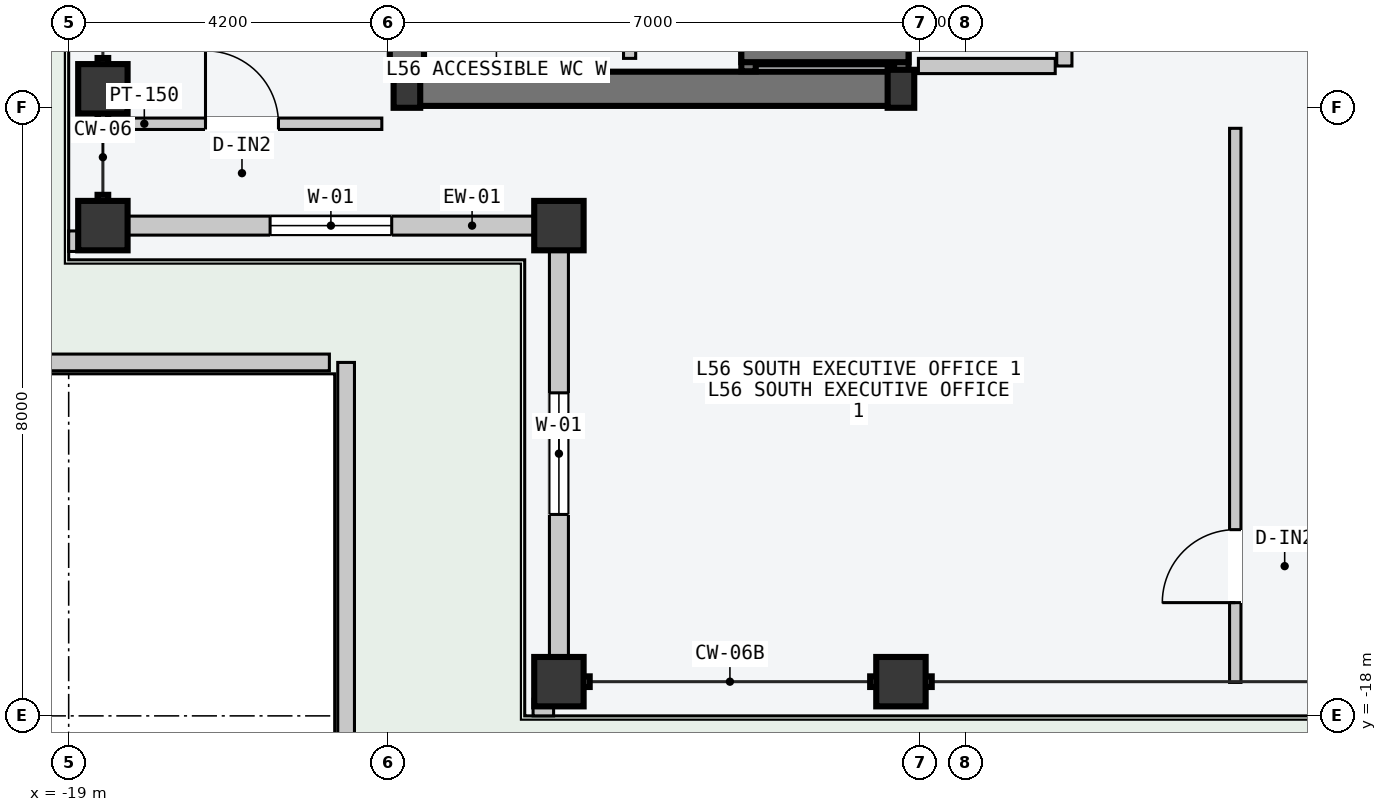
"""IFC4 building model, lengths in metres.
Left out: names, types, materials, properties, quantities, classifications, styles, units other than length and angle.
Written with IfcOpenShell. Run it as: python <this file> out.ifc"""

import sys

from ifc_helpers import new_model, si_unit, direction, frame, frame_2d, origin, origin_2d, place, context, subcontext, project, spatial, rectangle, hollow_rectangle, i_section, extrude, element, fill, save


model = new_model("IFC4")
c1 = context("Model", 3, precision=1e-05, world=origin(), true_north=direction((0.0, 1.0)))
c2 = subcontext(c1, "Body", "Model", "MODEL_VIEW")
j1 = project(units=[si_unit("LENGTHUNIT", "METRE"), si_unit("PLANEANGLEUNIT", "RADIAN")], contexts=[c1])
p1 = place(None, origin())
s1 = spatial("IfcSite", under=j1, at=p1, CompositionType="ELEMENT")
p2 = place(p1, origin())
s2 = spatial("IfcBuilding", under=s1, at=p2, CompositionType="ELEMENT")
p3 = place(p2, frame((0.0, 0.0, 213.9)))
s3 = spatial("IfcBuildingStorey", under=s2, at=p3, CompositionType="ELEMENT", Elevation=213.9)
p4 = place(p3, frame((-14.53, -9.75, -0.2), z_axis=(0.0, 0.0, 1.0), x_axis=(1.0, 0.0, 0.0)))
e1 = element("IfcWall", 1, at=p4, inside=s3, PredefinedType="SHEAR", context=c2, shape_type="SweptSolid", body=[
    extrude(rectangle(XDim=6.46, YDim=0.45, at=frame_2d((3.23, 0.0))), origin(), (0.0, 0.0, 1.0), 4.5),
])
p5 = place(p3, frame((-14.55, -9.5, -0.2), z_axis=(0.0, 0.0, 1.0), x_axis=(0.0, 1.0, 0.0)))
e2 = element("IfcWall", 2, at=p5, inside=s3, PredefinedType="SHEAR", context=c2, shape_type="SweptSolid", body=[
    extrude(rectangle(XDim=9.25, YDim=0.45, at=frame_2d((4.625, 0.0))), origin(), (0.0, 0.0, 1.0), 4.5),
])
for number, where, z_axis, x_axis in (
    (3, (-14.55, -9.75, 0.0), (0.0, 0.0, 1.0), (1.0, 0.0, 0.0)),
    (4, (-8.05, -9.75, 0.0), (0.0, 0.0, 1.0), (1.0, 0.0, 0.0)),
):
    element("IfcColumn", number, at=place(p3, frame(where, z_axis=z_axis, x_axis=x_axis)), inside=s3, PredefinedType="COLUMN", context=c2, shape_type="SweptSolid", body=[
        extrude(i_section(OverallWidth=0.35, OverallDepth=0.5, WebThickness=0.02, FlangeThickness=0.032, at=origin_2d()), origin(), (0.0, 0.0, 1.0), 4.5),
    ])
for number, where, z_axis, x_axis in (
    (5, (-12.55, -17.55, -0.2), (0.0, 0.0, 1.0), (1.0, 0.0, 0.0)),
    (6, (-8.05, -17.55, -0.2), (0.0, 0.0, 1.0), (1.0, 0.0, 0.0)),
    (7, (-18.55, -11.55, -0.2), (0.0, 0.0, 1.0), (0.0, 1.0, 0.0)),
    (8, (-18.55, -9.75, -0.2), (0.0, 0.0, 1.0), (0.0, 1.0, 0.0)),
    (9, (-12.55, -11.55, -0.2), (0.0, 0.0, 1.0), (1.0, 0.0, 0.0)),
):
    element("IfcColumn", number, at=place(p3, frame(where, z_axis=z_axis, x_axis=x_axis)), inside=s3, PredefinedType="COLUMN", context=c2, shape_type="SweptSolid", body=[
        extrude(hollow_rectangle(XDim=0.65, YDim=0.65, WallThickness=0.028, at=origin_2d()), origin(), (0.0, 0.0, 1.0), 4.7),
    ])
p6 = place(p3, frame((-18.215, -11.55, 0.0), z_axis=(0.0, 0.0, 1.0), x_axis=(1.0, 0.0, 0.0)))
e10 = element("IfcWall", 10, at=p6, inside=s3, PredefinedType="STANDARD", context=c2, shape_type="SweptSolid", body=[
    extrude(rectangle(XDim=5.33, YDim=0.25, at=frame_2d((2.665, 0.0))), origin(), (0.0, 0.0, 1.0), 3.75),
])
p7 = place(p6, frame((1.865, 0.0, 0.85)))
e11 = element("IfcOpeningElement", 11, at=p7, cuts=e10, PredefinedType="OPENING", context=c2, shape_type="SweptSolid", body=[
    extrude(rectangle(XDim=1.6, YDim=2.0, at=frame_2d((0.8, 1.0))), frame((0.0, 0.135, 0.0), z_axis=(0.0, -1.0, 0.0), x_axis=(1.0, 0.0, 0.0)), (0.0, 0.0, 1.0), 0.27),
])
p8 = place(p3, frame((-12.55, -17.215, 0.0), z_axis=(0.0, 0.0, 1.0), x_axis=(0.0, 1.0, 0.0)))
e12 = element("IfcWall", 12, at=p8, inside=s3, PredefinedType="STANDARD", context=c2, shape_type="SweptSolid", body=[
    extrude(rectangle(XDim=5.33, YDim=0.25, at=frame_2d((2.665, 0.0))), origin(), (0.0, 0.0, 1.0), 3.75),
])
p9 = place(p8, frame((1.865, 0.0, 0.85)))
e13 = element("IfcOpeningElement", 13, at=p9, cuts=e12, PredefinedType="OPENING", context=c2, shape_type="SweptSolid", body=[
    extrude(rectangle(XDim=1.6, YDim=2.0, at=frame_2d((0.8, 1.0))), frame((0.0, 0.135, 0.0), z_axis=(0.0, -1.0, 0.0), x_axis=(1.0, 0.0, 0.0)), (0.0, 0.0, 1.0), 0.27),
])
for number, where, z_axis, x_axis in (
    (14, (-12.89, -17.89, 0.0), (0.0, 0.0, 1.0), (1.0, 0.0, 0.0)),
    (15, (-18.89, -11.89, 0.0), (0.0, 0.0, 1.0), (0.0, 1.0, 0.0)),
):
    element("IfcWall", number, at=place(p3, frame(where, z_axis=z_axis, x_axis=x_axis)), inside=s3, PredefinedType="PARAPET", context=c2, shape_type="SweptSolid", body=[
        extrude(rectangle(XDim=0.27, YDim=0.22, at=frame_2d((0.135, 0.0))), origin(), (0.0, 0.0, 1.0), 1.2),
    ])
p10 = place(p3, frame((-20.85, -13.35, 0.0), z_axis=(0.0, 0.0, 1.0), x_axis=(1.0, 0.0, 0.0)))
e16 = element("IfcWall", 16, at=p10, inside=s3, PredefinedType="PARAPET", context=c2, shape_type="SweptSolid", body=[
    extrude(rectangle(XDim=5.28, YDim=0.22, at=frame_2d((2.64, 0.0))), origin(), (0.0, 0.0, 1.0), 1.2),
])
p11 = place(p3, frame((-15.35, -13.35, 0.0), z_axis=(0.0, 0.0, 1.0), x_axis=(0.0, -1.0, 0.0)))
e17 = element("IfcWall", 17, at=p11, inside=s3, PredefinedType="PARAPET", context=c2, shape_type="SweptSolid", body=[
    extrude(rectangle(XDim=5.28, YDim=0.22, at=frame_2d((2.64, 0.0))), origin(), (0.0, 0.0, 1.0), 1.2),
])
p12 = place(p3, frame((-8.045, -9.52, -0.2), z_axis=(0.0, 0.0, 1.0), x_axis=(0.0, 1.0, 0.0)))
e18 = element("IfcWall", 18, at=p12, inside=s3, PredefinedType="SOLIDWALL", context=c2, shape_type="SweptSolid", body=[
    extrude(rectangle(XDim=2.12, YDim=0.19, at=frame_2d((1.06, 0.0))), origin(), (0.0, 0.0, 1.0), 4.5),
])
p13 = place(p12, frame((0.57, 0.0, 0.2)))
e19 = element("IfcOpeningElement", 19, at=p13, cuts=e18, PredefinedType="OPENING", context=c2, shape_type="SweptSolid", body=[
    extrude(rectangle(XDim=1.1, YDim=2.2, at=frame_2d((0.55, 1.1))), frame((0.0, 0.105, 0.0), z_axis=(0.0, -1.0, 0.0), x_axis=(1.0, 0.0, 0.0)), (0.0, 0.0, 1.0), 0.21),
])
p14 = place(p3, frame((-10.055, -9.52, -0.2), z_axis=(0.0, 0.0, 1.0), x_axis=(0.0, 1.0, 0.0)))
e20 = element("IfcWall", 20, at=p14, inside=s3, PredefinedType="SOLIDWALL", context=c2, shape_type="SweptSolid", body=[
    extrude(rectangle(XDim=2.12, YDim=0.19, at=frame_2d((1.06, 0.0))), origin(), (0.0, 0.0, 1.0), 4.5),
])
p15 = place(p3, frame((-10.15, -9.305, -0.2), z_axis=(0.0, 0.0, 1.0), x_axis=(1.0, 0.0, 0.0)))
e21 = element("IfcWall", 21, at=p15, inside=s3, PredefinedType="SOLIDWALL", context=c2, shape_type="SweptSolid", body=[
    extrude(rectangle(XDim=2.2, YDim=0.19, at=frame_2d((1.1, 0.0))), origin(), (0.0, 0.0, 1.0), 4.5),
])
p16 = place(p3, frame((-5.9, -9.45, 0.0), z_axis=(0.0, 0.0, 1.0), x_axis=(0.0, 1.0, 0.0)))
e22 = element("IfcWall", 22, at=p16, inside=s3, PredefinedType="PARTITIONING", context=c2, shape_type="SweptSolid", body=[
    extrude(rectangle(XDim=10.5, YDim=0.2, at=frame_2d((5.25, 0.0))), origin(), (0.0, 0.0, 1.0), 4.3),
])
p17 = place(p16, frame((3.9, 0.0, 0.0)))
e23 = element("IfcOpeningElement", 23, at=p17, cuts=e22, PredefinedType="OPENING", context=c2, shape_type="SweptSolid", body=[
    extrude(rectangle(XDim=1.5, YDim=2.2, at=frame_2d((0.75, 1.1))), frame((0.0, 0.11, 0.0), z_axis=(0.0, -1.0, 0.0), x_axis=(1.0, 0.0, 0.0)), (0.0, 0.0, 1.0), 0.22),
])
p18 = place(p3, frame((-6.02, -9.45, 0.0), z_axis=(0.0, 0.0, 1.0), x_axis=(-1.0, 0.0, 0.0)))
e24 = element("IfcWall", 24, at=p18, inside=s3, PredefinedType="PARTITIONING", context=c2, shape_type="SweptSolid", body=[
    extrude(rectangle(XDim=1.8, YDim=0.2, at=frame_2d((0.9, 0.0))), origin(), (0.0, 0.0, 1.0), 4.3),
])
p19 = place(p3, frame((-11.62, -9.35, 0.0), z_axis=(0.0, 0.0, 1.0), x_axis=(0.0, 1.0, 0.0)))
e25 = element("IfcWall", 25, at=p19, inside=s3, PredefinedType="PARTITIONING", context=c2, shape_type="SweptSolid", body=[
    extrude(rectangle(XDim=3.85, YDim=0.16, at=frame_2d((1.925, 0.0))), origin(), (0.0, 0.0, 1.0), 4.3),
])
p20 = place(p19, frame((0.3, 0.0, 0.0)))
e26 = element("IfcOpeningElement", 26, at=p20, cuts=e25, PredefinedType="OPENING", context=c2, shape_type="SweptSolid", body=[
    extrude(rectangle(XDim=0.85, YDim=2.12, at=frame_2d((0.425, 1.06))), frame((0.0, 0.09, 0.0), z_axis=(0.0, -1.0, 0.0), x_axis=(1.0, 0.0, 0.0)), (0.0, 0.0, 1.0), 0.18),
])
p21 = place(p19, frame((1.5, 0.0, 0.0)))
e27 = element("IfcOpeningElement", 27, at=p21, cuts=e25, PredefinedType="OPENING", context=c2, shape_type="SweptSolid", body=[
    extrude(rectangle(XDim=0.85, YDim=2.12, at=frame_2d((0.425, 1.06))), frame((0.0, 0.09, 0.0), z_axis=(0.0, -1.0, 0.0), x_axis=(1.0, 0.0, 0.0)), (0.0, 0.0, 1.0), 0.18),
])
p22 = place(p19, frame((2.7, 0.0, 0.0)))
e28 = element("IfcOpeningElement", 28, at=p22, cuts=e25, PredefinedType="OPENING", context=c2, shape_type="SweptSolid", body=[
    extrude(rectangle(XDim=0.85, YDim=2.12, at=frame_2d((0.425, 1.06))), frame((0.0, 0.09, 0.0), z_axis=(0.0, -1.0, 0.0), x_axis=(1.0, 0.0, 0.0)), (0.0, 0.0, 1.0), 0.18),
])
p23 = place(p3, frame((-3.651, -17.56, 0.0), z_axis=(0.0, 0.0, 1.0), x_axis=(0.0, 1.0, 0.0)))
e29 = element("IfcWall", 29, at=p23, inside=s3, PredefinedType="PARTITIONING", context=c2, shape_type="SweptSolid", body=[
    extrude(rectangle(XDim=7.29, YDim=0.15, at=frame_2d((3.645, 0.0))), origin(), (0.0, 0.0, 1.0), 4.3),
])
p24 = place(p23, frame((1.05, 0.0, 0.0)))
e30 = element("IfcOpeningElement", 30, at=p24, cuts=e29, PredefinedType="OPENING", context=c2, shape_type="SweptSolid", body=[
    extrude(rectangle(XDim=0.96, YDim=2.18, at=frame_2d((0.48, 1.09))), frame((0.0, 0.085, 0.0), z_axis=(0.0, -1.0, 0.0), x_axis=(1.0, 0.0, 0.0)), (0.0, 0.0, 1.0), 0.17),
])
p25 = place(p3, frame((-18.56, -10.21, 0.0), z_axis=(0.0, 0.0, 1.0), x_axis=(1.0, 0.0, 0.0)))
e31 = element("IfcWall", 31, at=p25, inside=s3, PredefinedType="PARTITIONING", context=c2, shape_type="SweptSolid", body=[
    extrude(rectangle(XDim=3.68, YDim=0.15, at=frame_2d((1.84, 0.0))), origin(), (0.0, 0.0, 1.0), 4.3),
])
p26 = place(p25, frame((1.36, 0.0, 0.0)))
e32 = element("IfcOpeningElement", 32, at=p26, cuts=e31, PredefinedType="OPENING", context=c2, shape_type="SweptSolid", body=[
    extrude(rectangle(XDim=0.96, YDim=2.18, at=frame_2d((0.48, 1.09))), frame((0.0, 0.085, 0.0), z_axis=(0.0, -1.0, 0.0), x_axis=(1.0, 0.0, 0.0)), (0.0, 0.0, 1.0), 0.17),
])
p27 = place(p7, origin())
e33 = element("IfcWindow", 33, at=p27, inside=s3, PartitioningType="SINGLE_PANEL", PredefinedType="WINDOW", context=c2, shape_type="SweptSolid", body=[
    extrude(rectangle(XDim=1.6, YDim=2.0, at=frame_2d((0.8, 1.0))), frame((0.0, 0.03, 0.0), z_axis=(0.0, -1.0, 0.0), x_axis=(1.0, 0.0, 0.0)), (0.0, 0.0, 1.0), 0.06),
])
fill(e11, e33)
p28 = place(p9, origin())
e34 = element("IfcWindow", 34, at=p28, inside=s3, PartitioningType="SINGLE_PANEL", PredefinedType="WINDOW", context=c2, shape_type="SweptSolid", body=[
    extrude(rectangle(XDim=1.6, YDim=2.0, at=frame_2d((0.8, 1.0))), frame((0.0, 0.03, 0.0), z_axis=(0.0, -1.0, 0.0), x_axis=(1.0, 0.0, 0.0)), (0.0, 0.0, 1.0), 0.06),
])
fill(e13, e34)
p29 = place(p24, origin())
e35 = element("IfcDoor", 35, at=p29, inside=s3, OperationType="SINGLE_SWING_LEFT", PredefinedType="DOOR", context=c2, shape_type="SweptSolid", body=[
    extrude(rectangle(XDim=0.96, YDim=2.18, at=frame_2d((0.48, 1.09))), frame((0.0, 0.025, 0.0), z_axis=(0.0, -1.0, 0.0), x_axis=(1.0, 0.0, 0.0)), (0.0, 0.0, 1.0), 0.05),
])
fill(e30, e35)
p30 = place(p26, origin())
e36 = element("IfcDoor", 36, at=p30, inside=s3, OperationType="SINGLE_SWING_LEFT", PredefinedType="DOOR", context=c2, shape_type="SweptSolid", body=[
    extrude(rectangle(XDim=0.96, YDim=2.18, at=frame_2d((0.48, 1.09))), frame((0.0, 0.025, 0.0), z_axis=(0.0, -1.0, 0.0), x_axis=(1.0, 0.0, 0.0)), (0.0, 0.0, 1.0), 0.05),
])
fill(e32, e36)
save(model, sys.argv[1])
